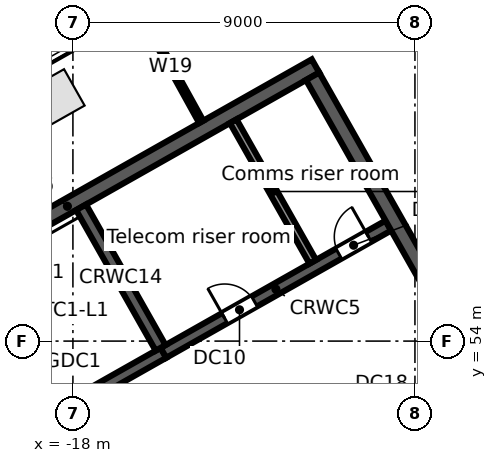
"""IFC4 building model, lengths in metres.
Left out: names, types, materials, properties, quantities, classifications, styles, units other than length and angle.
Written with IfcOpenShell. Run it as: python <this file> out.ifc"""

import sys

from ifc_helpers import new_model, si_unit, direction, frame, frame_2d, origin, origin_2d, place, context, subcontext, project, spatial, rectangle, extrude, element, fill, save


model = new_model("IFC4")
c1 = context("Model", 3, precision=1e-05, world=origin(), true_north=direction((0.0, 1.0)))
c2 = subcontext(c1, "Body", "Model", "MODEL_VIEW")
j1 = project(units=[si_unit("LENGTHUNIT", "METRE"), si_unit("PLANEANGLEUNIT", "RADIAN")], contexts=[c1])
p1 = place(None, origin())
s1 = spatial("IfcSite", under=j1, at=p1, CompositionType="ELEMENT")
p2 = place(p1, origin())
s2 = spatial("IfcBuilding", under=s1, at=p2, CompositionType="ELEMENT")
p3 = place(p2, frame((0.0, 0.0, 300.7)))
s3 = spatial("IfcBuildingStorey", under=s2, at=p3, CompositionType="ELEMENT", Elevation=300.7)
p4 = place(p3, frame((-18.441, 60.406, 0.0), z_axis=(0.0, 0.0, 1.0), x_axis=(-0.87035569594, -0.492423560103, 0.0)))
e1 = element("IfcColumn", 1, at=p4, inside=s3, PredefinedType="COLUMN", context=c2, shape_type="SweptSolid", body=[
    extrude(rectangle(XDim=1.1, YDim=1.1, at=origin_2d()), origin(), (0.0, 0.0, 1.0), 3.8),
])
p5 = place(p3, frame((-58.732, 38.771, 0.0), z_axis=(0.0, 0.0, 1.0), x_axis=(0.870355615581, 0.492423702137, 0.0)))
e2 = element("IfcWall", 2, at=p5, inside=s3, PredefinedType="STANDARD", context=c2, shape_type="SweptSolid", body=[
    extrude(rectangle(XDim=64.052, YDim=0.25, at=frame_2d((32.026, 0.0))), origin(), (0.0, 0.0, 1.0), 3.52),
])
p6 = place(p5, frame((61.259, 0.0, 0.8)))
e3 = element("IfcOpeningElement", 3, at=p6, cuts=e2, PredefinedType="OPENING", context=c2, shape_type="SweptSolid", body=[
    extrude(rectangle(XDim=2.4, YDim=2.2, at=frame_2d((1.2, 1.1))), frame((0.0, 0.135, 0.0), z_axis=(0.0, -1.0, 0.0), x_axis=(1.0, 0.0, 0.0)), (0.0, 0.0, 1.0), 0.27),
])
p7 = place(p5, frame((58.216, 0.0, 0.8)))
e4 = element("IfcOpeningElement", 4, at=p7, cuts=e2, PredefinedType="OPENING", context=c2, shape_type="SweptSolid", body=[
    extrude(rectangle(XDim=2.4, YDim=2.2, at=frame_2d((1.2, 1.1))), frame((0.0, 0.135, 0.0), z_axis=(0.0, -1.0, 0.0), x_axis=(1.0, 0.0, 0.0)), (0.0, 0.0, 1.0), 0.27),
])
p8 = place(p5, frame((55.173, 0.0, 0.8)))
e5 = element("IfcOpeningElement", 5, at=p8, cuts=e2, PredefinedType="OPENING", context=c2, shape_type="SweptSolid", body=[
    extrude(rectangle(XDim=2.4, YDim=2.2, at=frame_2d((1.2, 1.1))), frame((0.0, 0.135, 0.0), z_axis=(0.0, -1.0, 0.0), x_axis=(1.0, 0.0, 0.0)), (0.0, 0.0, 1.0), 0.27),
])
p9 = place(p5, frame((52.129, 0.0, 0.8)))
e6 = element("IfcOpeningElement", 6, at=p9, cuts=e2, PredefinedType="OPENING", context=c2, shape_type="SweptSolid", body=[
    extrude(rectangle(XDim=2.4, YDim=2.2, at=frame_2d((1.2, 1.1))), frame((0.0, 0.135, 0.0), z_axis=(0.0, -1.0, 0.0), x_axis=(1.0, 0.0, 0.0)), (0.0, 0.0, 1.0), 0.27),
])
p10 = place(p5, frame((49.086, 0.0, 0.8)))
e7 = element("IfcOpeningElement", 7, at=p10, cuts=e2, PredefinedType="OPENING", context=c2, shape_type="SweptSolid", body=[
    extrude(rectangle(XDim=2.4, YDim=2.2, at=frame_2d((1.2, 1.1))), frame((0.0, 0.135, 0.0), z_axis=(0.0, -1.0, 0.0), x_axis=(1.0, 0.0, 0.0)), (0.0, 0.0, 1.0), 0.27),
])
p11 = place(p5, frame((46.043, 0.0, 0.8)))
e8 = element("IfcOpeningElement", 8, at=p11, cuts=e2, PredefinedType="OPENING", context=c2, shape_type="SweptSolid", body=[
    extrude(rectangle(XDim=2.4, YDim=2.2, at=frame_2d((1.2, 1.1))), frame((0.0, 0.135, 0.0), z_axis=(0.0, -1.0, 0.0), x_axis=(1.0, 0.0, 0.0)), (0.0, 0.0, 1.0), 0.27),
])
p12 = place(p5, frame((43.0, 0.0, 0.8)))
e9 = element("IfcOpeningElement", 9, at=p12, cuts=e2, PredefinedType="OPENING", context=c2, shape_type="SweptSolid", body=[
    extrude(rectangle(XDim=2.4, YDim=2.2, at=frame_2d((1.2, 1.1))), frame((0.0, 0.135, 0.0), z_axis=(0.0, -1.0, 0.0), x_axis=(1.0, 0.0, 0.0)), (0.0, 0.0, 1.0), 0.27),
])
p13 = place(p5, frame((39.956, 0.0, 0.8)))
e10 = element("IfcOpeningElement", 10, at=p13, cuts=e2, PredefinedType="OPENING", context=c2, shape_type="SweptSolid", body=[
    extrude(rectangle(XDim=2.4, YDim=2.2, at=frame_2d((1.2, 1.1))), frame((0.0, 0.135, 0.0), z_axis=(0.0, -1.0, 0.0), x_axis=(1.0, 0.0, 0.0)), (0.0, 0.0, 1.0), 0.27),
])
p14 = place(p5, frame((36.913, 0.0, 0.8)))
e11 = element("IfcOpeningElement", 11, at=p14, cuts=e2, PredefinedType="OPENING", context=c2, shape_type="SweptSolid", body=[
    extrude(rectangle(XDim=2.4, YDim=2.2, at=frame_2d((1.2, 1.1))), frame((0.0, 0.135, 0.0), z_axis=(0.0, -1.0, 0.0), x_axis=(1.0, 0.0, 0.0)), (0.0, 0.0, 1.0), 0.27),
])
p15 = place(p5, frame((33.87, 0.0, 0.8)))
e12 = element("IfcOpeningElement", 12, at=p15, cuts=e2, PredefinedType="OPENING", context=c2, shape_type="SweptSolid", body=[
    extrude(rectangle(XDim=2.4, YDim=2.2, at=frame_2d((1.2, 1.1))), frame((0.0, 0.135, 0.0), z_axis=(0.0, -1.0, 0.0), x_axis=(1.0, 0.0, 0.0)), (0.0, 0.0, 1.0), 0.27),
])
p16 = place(p5, frame((30.826, 0.0, 0.8)))
e13 = element("IfcOpeningElement", 13, at=p16, cuts=e2, PredefinedType="OPENING", context=c2, shape_type="SweptSolid", body=[
    extrude(rectangle(XDim=2.4, YDim=2.2, at=frame_2d((1.2, 1.1))), frame((0.0, 0.135, 0.0), z_axis=(0.0, -1.0, 0.0), x_axis=(1.0, 0.0, 0.0)), (0.0, 0.0, 1.0), 0.27),
])
p17 = place(p5, frame((27.783, 0.0, 0.8)))
e14 = element("IfcOpeningElement", 14, at=p17, cuts=e2, PredefinedType="OPENING", context=c2, shape_type="SweptSolid", body=[
    extrude(rectangle(XDim=2.4, YDim=2.2, at=frame_2d((1.2, 1.1))), frame((0.0, 0.135, 0.0), z_axis=(0.0, -1.0, 0.0), x_axis=(1.0, 0.0, 0.0)), (0.0, 0.0, 1.0), 0.27),
])
p18 = place(p5, frame((24.74, 0.0, 0.8)))
e15 = element("IfcOpeningElement", 15, at=p18, cuts=e2, PredefinedType="OPENING", context=c2, shape_type="SweptSolid", body=[
    extrude(rectangle(XDim=2.4, YDim=2.2, at=frame_2d((1.2, 1.1))), frame((0.0, 0.135, 0.0), z_axis=(0.0, -1.0, 0.0), x_axis=(1.0, 0.0, 0.0)), (0.0, 0.0, 1.0), 0.27),
])
p19 = place(p5, frame((21.696, 0.0, 0.8)))
e16 = element("IfcOpeningElement", 16, at=p19, cuts=e2, PredefinedType="OPENING", context=c2, shape_type="SweptSolid", body=[
    extrude(rectangle(XDim=2.4, YDim=2.2, at=frame_2d((1.2, 1.1))), frame((0.0, 0.135, 0.0), z_axis=(0.0, -1.0, 0.0), x_axis=(1.0, 0.0, 0.0)), (0.0, 0.0, 1.0), 0.27),
])
p20 = place(p5, frame((18.653, 0.0, 0.8)))
e17 = element("IfcOpeningElement", 17, at=p20, cuts=e2, PredefinedType="OPENING", context=c2, shape_type="SweptSolid", body=[
    extrude(rectangle(XDim=2.4, YDim=2.2, at=frame_2d((1.2, 1.1))), frame((0.0, 0.135, 0.0), z_axis=(0.0, -1.0, 0.0), x_axis=(1.0, 0.0, 0.0)), (0.0, 0.0, 1.0), 0.27),
])
p21 = place(p5, frame((15.61, 0.0, 0.8)))
e18 = element("IfcOpeningElement", 18, at=p21, cuts=e2, PredefinedType="OPENING", context=c2, shape_type="SweptSolid", body=[
    extrude(rectangle(XDim=2.4, YDim=2.2, at=frame_2d((1.2, 1.1))), frame((0.0, 0.135, 0.0), z_axis=(0.0, -1.0, 0.0), x_axis=(1.0, 0.0, 0.0)), (0.0, 0.0, 1.0), 0.27),
])
p22 = place(p5, frame((12.567, 0.0, 0.8)))
e19 = element("IfcOpeningElement", 19, at=p22, cuts=e2, PredefinedType="OPENING", context=c2, shape_type="SweptSolid", body=[
    extrude(rectangle(XDim=2.4, YDim=2.2, at=frame_2d((1.2, 1.1))), frame((0.0, 0.135, 0.0), z_axis=(0.0, -1.0, 0.0), x_axis=(1.0, 0.0, 0.0)), (0.0, 0.0, 1.0), 0.27),
])
p23 = place(p5, frame((9.523, 0.0, 0.8)))
e20 = element("IfcOpeningElement", 20, at=p23, cuts=e2, PredefinedType="OPENING", context=c2, shape_type="SweptSolid", body=[
    extrude(rectangle(XDim=2.4, YDim=2.2, at=frame_2d((1.2, 1.1))), frame((0.0, 0.135, 0.0), z_axis=(0.0, -1.0, 0.0), x_axis=(1.0, 0.0, 0.0)), (0.0, 0.0, 1.0), 0.27),
])
p24 = place(p5, frame((6.48, 0.0, 0.8)))
e21 = element("IfcOpeningElement", 21, at=p24, cuts=e2, PredefinedType="OPENING", context=c2, shape_type="SweptSolid", body=[
    extrude(rectangle(XDim=2.4, YDim=2.2, at=frame_2d((1.2, 1.1))), frame((0.0, 0.135, 0.0), z_axis=(0.0, -1.0, 0.0), x_axis=(1.0, 0.0, 0.0)), (0.0, 0.0, 1.0), 0.27),
])
p25 = place(p5, frame((3.437, 0.0, 0.8)))
e22 = element("IfcOpeningElement", 22, at=p25, cuts=e2, PredefinedType="OPENING", context=c2, shape_type="SweptSolid", body=[
    extrude(rectangle(XDim=2.4, YDim=2.2, at=frame_2d((1.2, 1.1))), frame((0.0, 0.135, 0.0), z_axis=(0.0, -1.0, 0.0), x_axis=(1.0, 0.0, 0.0)), (0.0, 0.0, 1.0), 0.27),
])
p26 = place(p5, frame((0.393, 0.0, 0.8)))
e23 = element("IfcOpeningElement", 23, at=p26, cuts=e2, PredefinedType="OPENING", context=c2, shape_type="SweptSolid", body=[
    extrude(rectangle(XDim=2.4, YDim=2.2, at=frame_2d((1.2, 1.1))), frame((0.0, 0.135, 0.0), z_axis=(0.0, -1.0, 0.0), x_axis=(1.0, 0.0, 0.0)), (0.0, 0.0, 1.0), 0.27),
])
p27 = place(p3, frame((-13.365, 49.911, 0.0), z_axis=(0.0, 0.0, 1.0), x_axis=(0.870347618718, 0.492437836272, 0.0)))
e24 = element("IfcWall", 24, at=p27, inside=s3, PredefinedType="SOLIDWALL", context=c2, shape_type="SweptSolid", body=[
    extrude(rectangle(XDim=6.7, YDim=0.3, at=frame_2d((3.35, 0.0))), origin(), (0.0, 0.0, 1.0), 3.52),
])
p28 = place(p27, frame((2.95, 0.0, 0.0)))
e25 = element("IfcOpeningElement", 25, at=p28, cuts=e24, PredefinedType="OPENING", context=c2, shape_type="SweptSolid", body=[
    extrude(rectangle(XDim=0.9, YDim=2.1, at=frame_2d((0.45, 1.05))), frame((0.0, 0.16, 0.0), z_axis=(0.0, -1.0, 0.0), x_axis=(1.0, 0.0, 0.0)), (0.0, 0.0, 1.0), 0.32),
])
p29 = place(p3, frame((-22.059, 50.047, 0.0), z_axis=(0.0, 0.0, 1.0), x_axis=(0.87035077051, 0.49243226567, 0.0)))
e26 = element("IfcWall", 26, at=p29, inside=s3, PredefinedType="SOLIDWALL", context=c2, shape_type="SweptSolid", body=[
    extrude(rectangle(XDim=7.4, YDim=0.3, at=frame_2d((3.7, 0.0))), origin(), (0.0, 0.0, 1.0), 3.52),
])
p30 = place(p29, frame((0.4, 0.0, 0.0)))
e27 = element("IfcOpeningElement", 27, at=p30, cuts=e26, PredefinedType="OPENING", context=c2, shape_type="SweptSolid", body=[
    extrude(rectangle(XDim=1.0, YDim=2.1, at=frame_2d((0.5, 1.05))), frame((0.0, 0.16, 0.0), z_axis=(0.0, -1.0, 0.0), x_axis=(1.0, 0.0, 0.0)), (0.0, 0.0, 1.0), 0.32),
])
p31 = place(p3, frame((-15.618, 53.691, 0.0), z_axis=(0.0, 0.0, 1.0), x_axis=(0.870362830851, 0.492410948978, 0.0)))
e28 = element("IfcWall", 28, at=p31, inside=s3, PredefinedType="SOLIDWALL", context=c2, shape_type="SweptSolid", body=[
    extrude(rectangle(XDim=6.8, YDim=0.3, at=frame_2d((3.4, 0.0))), origin(), (0.0, 0.0, 1.0), 3.52),
])
p32 = place(p31, frame((1.85, 0.0, 0.0)))
e29 = element("IfcOpeningElement", 29, at=p32, cuts=e28, PredefinedType="OPENING", context=c2, shape_type="SweptSolid", body=[
    extrude(rectangle(XDim=0.9, YDim=2.1, at=frame_2d((0.45, 1.05))), frame((0.0, 0.16, 0.0), z_axis=(0.0, -1.0, 0.0), x_axis=(1.0, 0.0, 0.0)), (0.0, 0.0, 1.0), 0.32),
])
p33 = place(p31, frame((5.3, 0.0, 0.0)))
e30 = element("IfcOpeningElement", 30, at=p33, cuts=e28, PredefinedType="OPENING", context=c2, shape_type="SweptSolid", body=[
    extrude(rectangle(XDim=0.9, YDim=2.1, at=frame_2d((0.45, 1.05))), frame((0.0, 0.16, 0.0), z_axis=(0.0, -1.0, 0.0), x_axis=(1.0, 0.0, 0.0)), (0.0, 0.0, 1.0), 0.32),
])
p34 = place(p3, frame((-24.672, 53.854, 0.0), z_axis=(0.0, 0.0, 1.0), x_axis=(0.870353598469, 0.492427267353, 0.0)))
e31 = element("IfcWall", 31, at=p34, inside=s3, PredefinedType="SOLIDWALL", context=c2, shape_type="SweptSolid", body=[
    extrude(rectangle(XDim=15.0, YDim=0.4, at=frame_2d((7.5, 0.0))), origin(), (0.0, 0.0, 1.0), 3.52),
])
p35 = place(p3, frame((-24.4, 53.779, 0.0), z_axis=(0.0, 0.0, 1.0), x_axis=(0.492421663121, -0.870356769198, 0.0)))
e32 = element("IfcWall", 32, at=p35, inside=s3, PredefinedType="SOLIDWALL", context=c2, shape_type="SweptSolid", body=[
    extrude(rectangle(XDim=13.2, YDim=0.4, at=frame_2d((6.6, 0.0))), origin(), (0.0, 0.0, 1.0), 3.52),
])
p36 = place(p3, frame((-17.785, 57.521, 0.0), z_axis=(0.0, 0.0, 1.0), x_axis=(0.492422543467, -0.870356271124, 0.0)))
e33 = element("IfcWall", 33, at=p36, inside=s3, PredefinedType="SOLIDWALL", context=c2, shape_type="SweptSolid", body=[
    extrude(rectangle(XDim=4.25, YDim=0.3, at=frame_2d((2.125, 0.0))), origin(), (0.0, 0.0, 1.0), 3.52),
])
p37 = place(p3, frame((-13.781, 59.786, 0.0), z_axis=(0.0, 0.0, 1.0), x_axis=(0.492422543467, -0.870356271124, 0.0)))
e34 = element("IfcWall", 34, at=p37, inside=s3, PredefinedType="PARTITIONING", context=c2, shape_type="SweptSolid", body=[
    extrude(rectangle(XDim=4.25, YDim=0.2, at=frame_2d((2.125, 0.0))), origin(), (0.0, 0.0, 1.0), 3.52),
])
p38 = place(p3, frame((-11.692, 60.968, 0.0), z_axis=(0.0, 0.0, 1.0), x_axis=(0.492421663121, -0.870356769198, 0.0)))
e35 = element("IfcWall", 35, at=p38, inside=s3, PredefinedType="SOLIDWALL", context=c2, shape_type="SweptSolid", body=[
    extrude(rectangle(XDim=13.2, YDim=0.4, at=frame_2d((6.6, 0.0))), origin(), (0.0, 0.0, 1.0), 3.52),
])
p39 = place(p3, frame((-16.229, 62.675, 0.0), z_axis=(0.0, 0.0, 1.0), x_axis=(0.483687594014, -0.875240716259, 0.0)))
e36 = element("IfcWall", 36, at=p39, inside=s3, PredefinedType="PARTITIONING", context=c2, shape_type="SweptSolid", body=[
    extrude(rectangle(XDim=3.32, YDim=0.125, at=frame_2d((1.66, 0.0))), origin(), (0.0, 0.0, 1.0), 2.888),
])
p40 = place(p11, origin())
e37 = element("IfcWindow", 37, at=p40, inside=s3, PartitioningType="SINGLE_PANEL", PredefinedType="WINDOW", context=c2, shape_type="SweptSolid", body=[
    extrude(rectangle(XDim=2.4, YDim=2.2, at=frame_2d((1.2, 1.1))), frame((0.0, 0.03, 0.0), z_axis=(0.0, -1.0, 0.0), x_axis=(1.0, 0.0, 0.0)), (0.0, 0.0, 1.0), 0.06),
])
fill(e8, e37)
p41 = place(p32, origin())
e38 = element("IfcDoor", 38, at=p41, inside=s3, OperationType="SINGLE_SWING_LEFT", PredefinedType="DOOR", context=c2, shape_type="SweptSolid", body=[
    extrude(rectangle(XDim=0.9, YDim=2.1, at=frame_2d((0.45, 1.05))), frame((0.0, 0.025, 0.0), z_axis=(0.0, -1.0, 0.0), x_axis=(1.0, 0.0, 0.0)), (0.0, 0.0, 1.0), 0.05),
])
fill(e29, e38)
p42 = place(p33, origin())
e39 = element("IfcDoor", 39, at=p42, inside=s3, OperationType="SINGLE_SWING_RIGHT", PredefinedType="DOOR", context=c2, shape_type="SweptSolid", body=[
    extrude(rectangle(XDim=0.9, YDim=2.1, at=frame_2d((0.45, 1.05))), frame((0.0, 0.025, 0.0), z_axis=(0.0, -1.0, 0.0), x_axis=(1.0, 0.0, 0.0)), (0.0, 0.0, 1.0), 0.05),
])
fill(e30, e39)
save(model, sys.argv[1])
